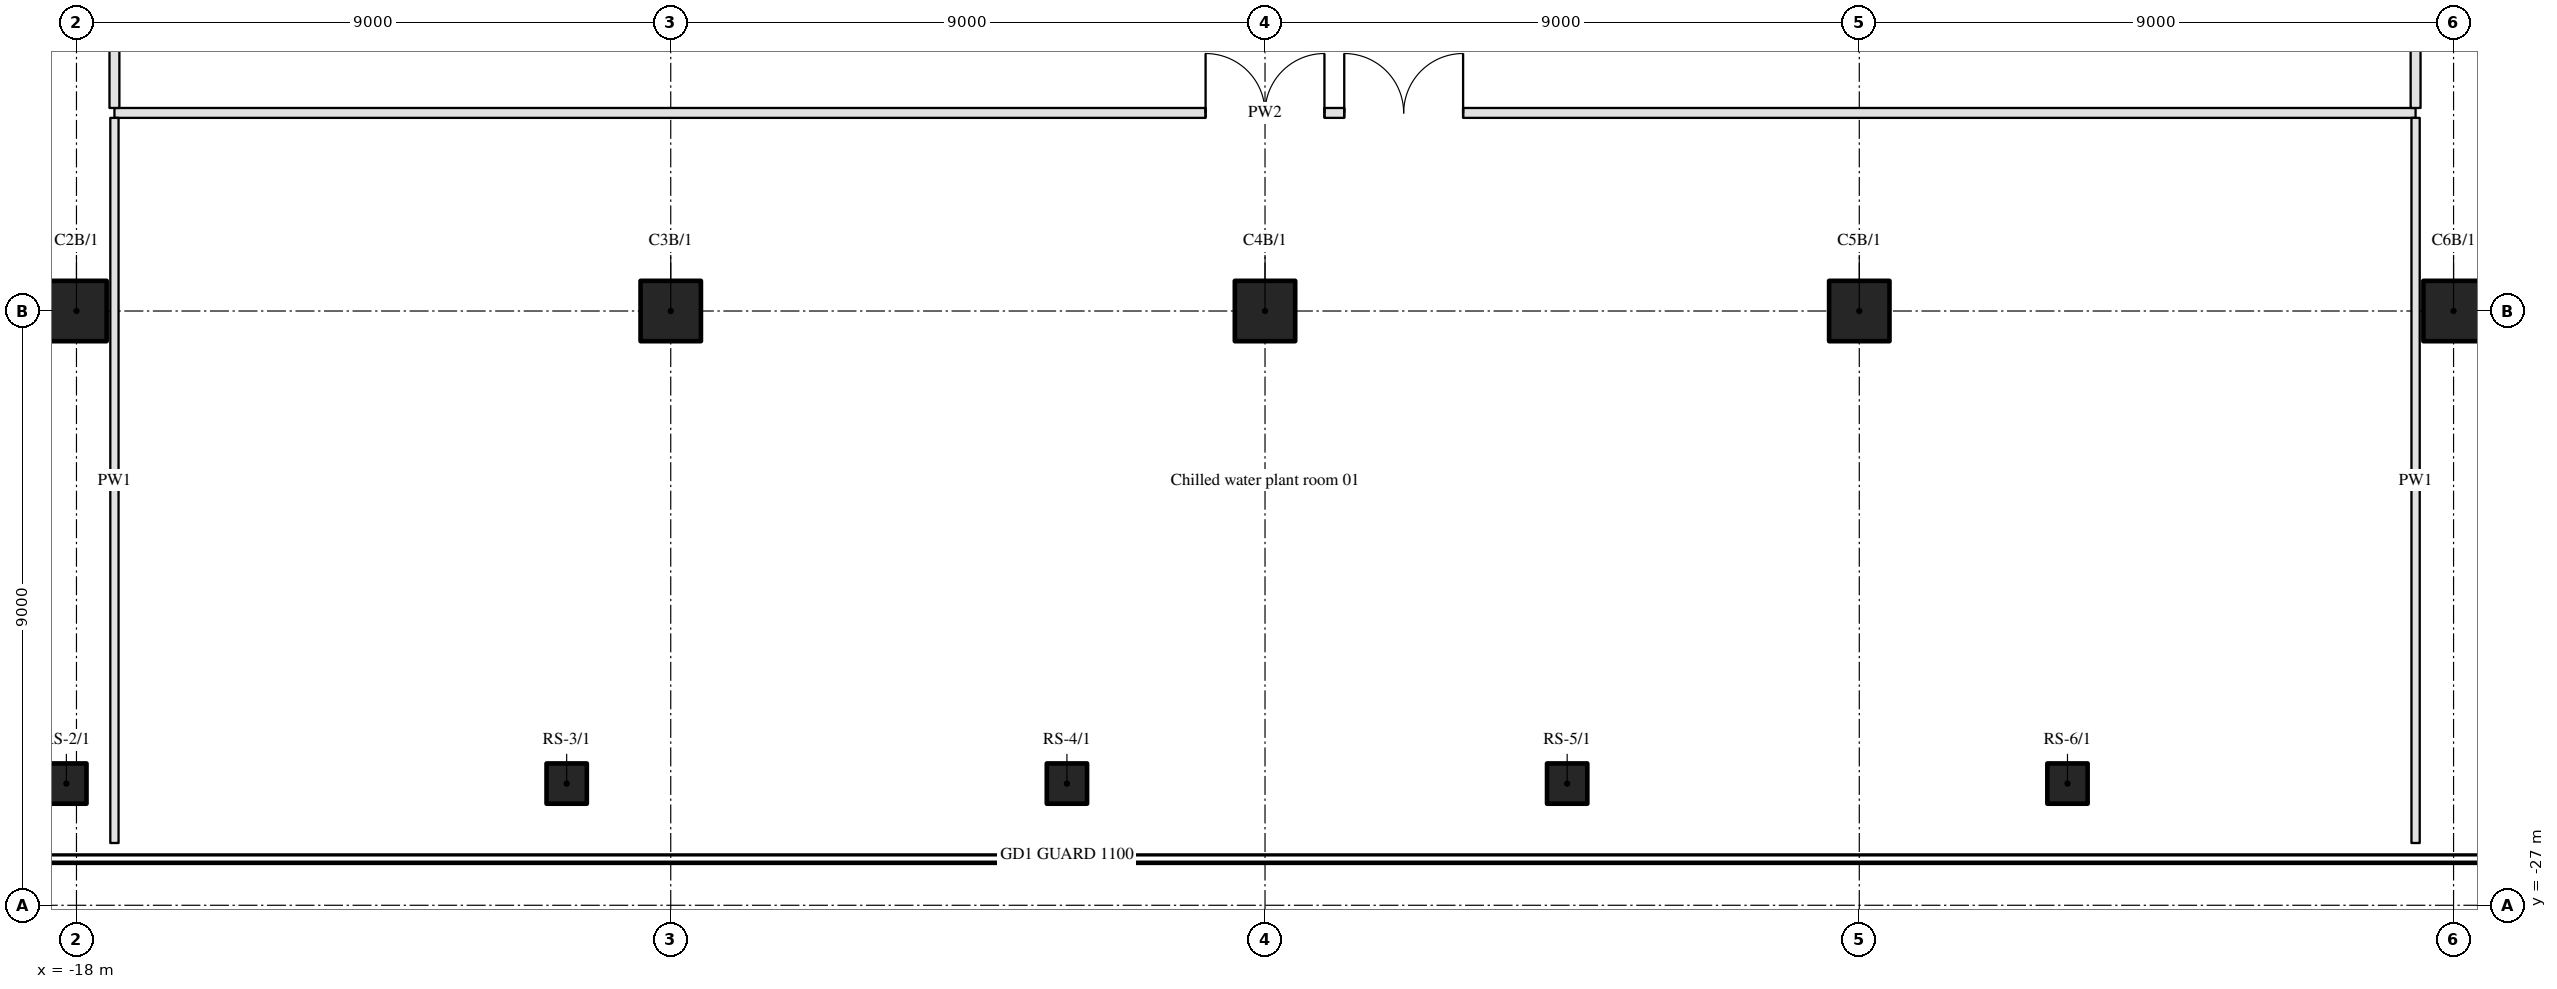
"""IFC4 building model, lengths in metres.
Left out: names, types, materials, properties, quantities, classifications, styles, units other than length and angle.
Written with IfcOpenShell. Run it as: python <this file> out.ifc"""

import sys

from ifc_helpers import new_model, si_unit, direction, frame, frame_2d, origin, origin_2d, place, context, subcontext, project, spatial, rectangle, hollow_circle, extrude, element, fill, save


model = new_model("IFC4")
c1 = context("Model", 3, precision=1e-05, world=origin(), true_north=direction((0.0, 1.0)))
c2 = subcontext(c1, "Body", "Model", "MODEL_VIEW")
j1 = project(units=[si_unit("LENGTHUNIT", "METRE"), si_unit("PLANEANGLEUNIT", "RADIAN")], contexts=[c1])
p1 = place(None, origin())
s1 = spatial("IfcSite", under=j1, at=p1, CompositionType="ELEMENT")
p2 = place(p1, origin())
s2 = spatial("IfcBuilding", under=s1, at=p2, CompositionType="ELEMENT")
p3 = place(p2, frame((0.0, 0.0, 57.6)))
s3 = spatial("IfcBuildingStorey", under=s2, at=p3, CompositionType="ELEMENT", Elevation=57.6)
p4 = place(p3, frame((-18.0, -18.0, 0.0), z_axis=(0.0, 0.0, 1.0), x_axis=(1.0, 0.0, 0.0)))
e1 = element("IfcColumn", 1, at=p4, inside=s3, PredefinedType="COLUMN", context=c2, shape_type="SweptSolid", body=[
    extrude(hollow_circle(Radius=0.457, WallThickness=0.05, at=origin_2d()), origin(), (0.0, 0.0, 1.0), 4.08),
])
for number, where, z_axis, x_axis in (
    (2, (-9.0, -18.0, 0.0), (0.0, 0.0, 1.0), (1.0, 0.0, 0.0)),
    (3, (0.0, -18.0, 0.0), (0.0, 0.0, 1.0), (1.0, 0.0, 0.0)),
    (4, (9.0, -18.0, 0.0), (0.0, 0.0, 1.0), (1.0, 0.0, 0.0)),
    (5, (18.0, -18.0, 0.0), (0.0, 0.0, 1.0), (1.0, 0.0, 0.0)),
):
    element("IfcColumn", number, at=place(p3, frame(where, z_axis=z_axis, x_axis=x_axis)), inside=s3, PredefinedType="COLUMN", context=c2, shape_type="SweptSolid", body=[
        extrude(hollow_circle(Radius=0.457, WallThickness=0.05, at=origin_2d()), origin(), (0.0, 0.0, 1.0), 4.5),
    ])
for number, where, z_axis, x_axis in (
    (6, (-18.153, -25.157, 0.0), (0.0, 0.0, 1.0), (1.0, 0.0, 0.0)),
    (7, (-10.576, -25.157, 0.0), (0.0, 0.0, 1.0), (1.0, 0.0, 0.0)),
    (8, (-3.0, -25.157, 0.0), (0.0, 0.0, 1.0), (1.0, 0.0, 0.0)),
    (9, (4.576, -25.157, 0.0), (0.0, 0.0, 1.0), (1.0, 0.0, 0.0)),
    (10, (12.153, -25.157, 0.0), (0.0, 0.0, 1.0), (1.0, 0.0, 0.0)),
):
    element("IfcColumn", number, at=place(p3, frame(where, z_axis=z_axis, x_axis=x_axis)), inside=s3, PredefinedType="COLUMN", context=c2, shape_type="SweptSolid", body=[
        extrude(hollow_circle(Radius=0.305, WallThickness=0.03, at=origin_2d()), origin(), (0.0, 0.0, 1.0), 4.08),
    ])
p5 = place(p3, frame((-17.425, -15.0, 0.0), z_axis=(0.0, 0.0, 1.0), x_axis=(1.0, 0.0, 0.0)))
e11 = element("IfcWall", 11, at=p5, inside=s3, PredefinedType="PARTITIONING", context=c2, shape_type="SweptSolid", body=[
    extrude(rectangle(XDim=34.85, YDim=0.15, at=frame_2d((17.425, 0.0))), origin(), (0.0, 0.0, 1.0), 3.56),
])
p6 = place(p5, frame((16.525, 0.0, 0.0)))
e12 = element("IfcOpeningElement", 12, at=p6, cuts=e11, PredefinedType="OPENING", context=c2, shape_type="SweptSolid", body=[
    extrude(rectangle(XDim=1.8, YDim=2.1, at=frame_2d((0.9, 1.05))), frame((0.0, 0.085, 0.0), z_axis=(0.0, -1.0, 0.0), x_axis=(1.0, 0.0, 0.0)), (0.0, 0.0, 1.0), 0.17),
])
p7 = place(p5, frame((18.625, 0.0, 0.0)))
e13 = element("IfcOpeningElement", 13, at=p7, cuts=e11, PredefinedType="OPENING", context=c2, shape_type="SweptSolid", body=[
    extrude(rectangle(XDim=1.8, YDim=2.1, at=frame_2d((0.9, 1.05))), frame((0.0, 0.085, 0.0), z_axis=(0.0, -1.0, 0.0), x_axis=(1.0, 0.0, 0.0)), (0.0, 0.0, 1.0), 0.17),
])
p8 = place(p3, frame((-17.425, -26.057, 0.0), z_axis=(0.0, 0.0, 1.0), x_axis=(0.0, 1.0, 0.0)))
e14 = element("IfcWall", 14, at=p8, inside=s3, PredefinedType="PARTITIONING", context=c2, shape_type="SweptSolid", body=[
    extrude(rectangle(XDim=10.982, YDim=0.125, at=frame_2d((5.491, 0.0))), origin(), (0.0, 0.0, 1.0), 3.56),
])
p9 = place(p3, frame((-17.425, 8.35, 0.0), z_axis=(0.0, 0.0, 1.0), x_axis=(0.0, -1.0, 0.0)))
e15 = element("IfcWall", 15, at=p9, inside=s3, PredefinedType="PARTITIONING", context=c2, shape_type="SweptSolid", body=[
    extrude(rectangle(XDim=23.275, YDim=0.15, at=frame_2d((11.638, 0.0))), origin(), (0.0, 0.0, 1.0), 3.56),
])
p10 = place(p9, frame((19.413, 0.0, 0.0)))
e16 = element("IfcOpeningElement", 16, at=p10, cuts=e15, PredefinedType="OPENING", context=c2, shape_type="SweptSolid", body=[
    extrude(rectangle(XDim=1.8, YDim=2.1, at=frame_2d((0.9, 1.05))), frame((0.0, 0.085, 0.0), z_axis=(0.0, -1.0, 0.0), x_axis=(1.0, 0.0, 0.0)), (0.0, 0.0, 1.0), 0.17),
])
p11 = place(p9, frame((11.05, 0.0, 0.0)))
e17 = element("IfcOpeningElement", 17, at=p11, cuts=e15, PredefinedType="OPENING", context=c2, shape_type="SweptSolid", body=[
    extrude(rectangle(XDim=1.8, YDim=2.1, at=frame_2d((0.9, 1.05))), frame((0.0, 0.085, 0.0), z_axis=(0.0, -1.0, 0.0), x_axis=(1.0, 0.0, 0.0)), (0.0, 0.0, 1.0), 0.17),
])
p12 = place(p9, frame((6.0, 0.0, 0.0)))
e18 = element("IfcOpeningElement", 18, at=p12, cuts=e15, PredefinedType="OPENING", context=c2, shape_type="SweptSolid", body=[
    extrude(rectangle(XDim=1.8, YDim=2.1, at=frame_2d((0.9, 1.05))), frame((0.0, 0.085, 0.0), z_axis=(0.0, -1.0, 0.0), x_axis=(1.0, 0.0, 0.0)), (0.0, 0.0, 1.0), 0.17),
])
p13 = place(p3, frame((17.425, -26.057, 0.0), z_axis=(0.0, 0.0, 1.0), x_axis=(0.0, 1.0, 0.0)))
e19 = element("IfcWall", 19, at=p13, inside=s3, PredefinedType="PARTITIONING", context=c2, shape_type="SweptSolid", body=[
    extrude(rectangle(XDim=10.982, YDim=0.125, at=frame_2d((5.491, 0.0))), origin(), (0.0, 0.0, 1.0), 3.56),
])
p14 = place(p3, frame((17.425, -14.925, 0.0), z_axis=(0.0, 0.0, 1.0), x_axis=(0.0, 1.0, 0.0)))
e20 = element("IfcWall", 20, at=p14, inside=s3, PredefinedType="PARTITIONING", context=c2, shape_type="SweptSolid", body=[
    extrude(rectangle(XDim=20.85, YDim=0.15, at=frame_2d((10.425, 0.0))), origin(), (0.0, 0.0, 1.0), 3.56),
])
p15 = place(p14, frame((6.562, 0.0, 0.0)))
e21 = element("IfcOpeningElement", 21, at=p15, cuts=e20, PredefinedType="OPENING", context=c2, shape_type="SweptSolid", body=[
    extrude(rectangle(XDim=1.8, YDim=2.1, at=frame_2d((0.9, 1.05))), frame((0.0, 0.085, 0.0), z_axis=(0.0, -1.0, 0.0), x_axis=(1.0, 0.0, 0.0)), (0.0, 0.0, 1.0), 0.17),
])
p16 = place(p14, frame((8.663, 0.0, 0.0)))
e22 = element("IfcOpeningElement", 22, at=p16, cuts=e20, PredefinedType="OPENING", context=c2, shape_type="SweptSolid", body=[
    extrude(rectangle(XDim=1.8, YDim=2.1, at=frame_2d((0.9, 1.05))), frame((0.0, 0.085, 0.0), z_axis=(0.0, -1.0, 0.0), x_axis=(1.0, 0.0, 0.0)), (0.0, 0.0, 1.0), 0.17),
])
p17 = place(p14, frame((16.988, 0.0, 0.0)))
e23 = element("IfcOpeningElement", 23, at=p17, cuts=e20, PredefinedType="OPENING", context=c2, shape_type="SweptSolid", body=[
    extrude(rectangle(XDim=1.8, YDim=2.1, at=frame_2d((0.9, 1.05))), frame((0.0, 0.085, 0.0), z_axis=(0.0, -1.0, 0.0), x_axis=(1.0, 0.0, 0.0)), (0.0, 0.0, 1.0), 0.17),
])
p18 = place(p6, origin())
e24 = element("IfcDoor", 24, at=p18, inside=s3, OperationType="DOUBLE_DOOR_SINGLE_SWING", PredefinedType="DOOR", context=c2, shape_type="SweptSolid", body=[
    extrude(rectangle(XDim=1.8, YDim=2.1, at=frame_2d((0.9, 1.05))), frame((0.0, 0.025, 0.0), z_axis=(0.0, -1.0, 0.0), x_axis=(1.0, 0.0, 0.0)), (0.0, 0.0, 1.0), 0.05),
])
fill(e12, e24)
p19 = place(p7, origin())
e25 = element("IfcDoor", 25, at=p19, inside=s3, OperationType="DOUBLE_DOOR_SINGLE_SWING", PredefinedType="DOOR", context=c2, shape_type="SweptSolid", body=[
    extrude(rectangle(XDim=1.8, YDim=2.1, at=frame_2d((0.9, 1.05))), frame((0.0, 0.025, 0.0), z_axis=(0.0, -1.0, 0.0), x_axis=(1.0, 0.0, 0.0)), (0.0, 0.0, 1.0), 0.05),
])
fill(e13, e25)
save(model, sys.argv[1])
